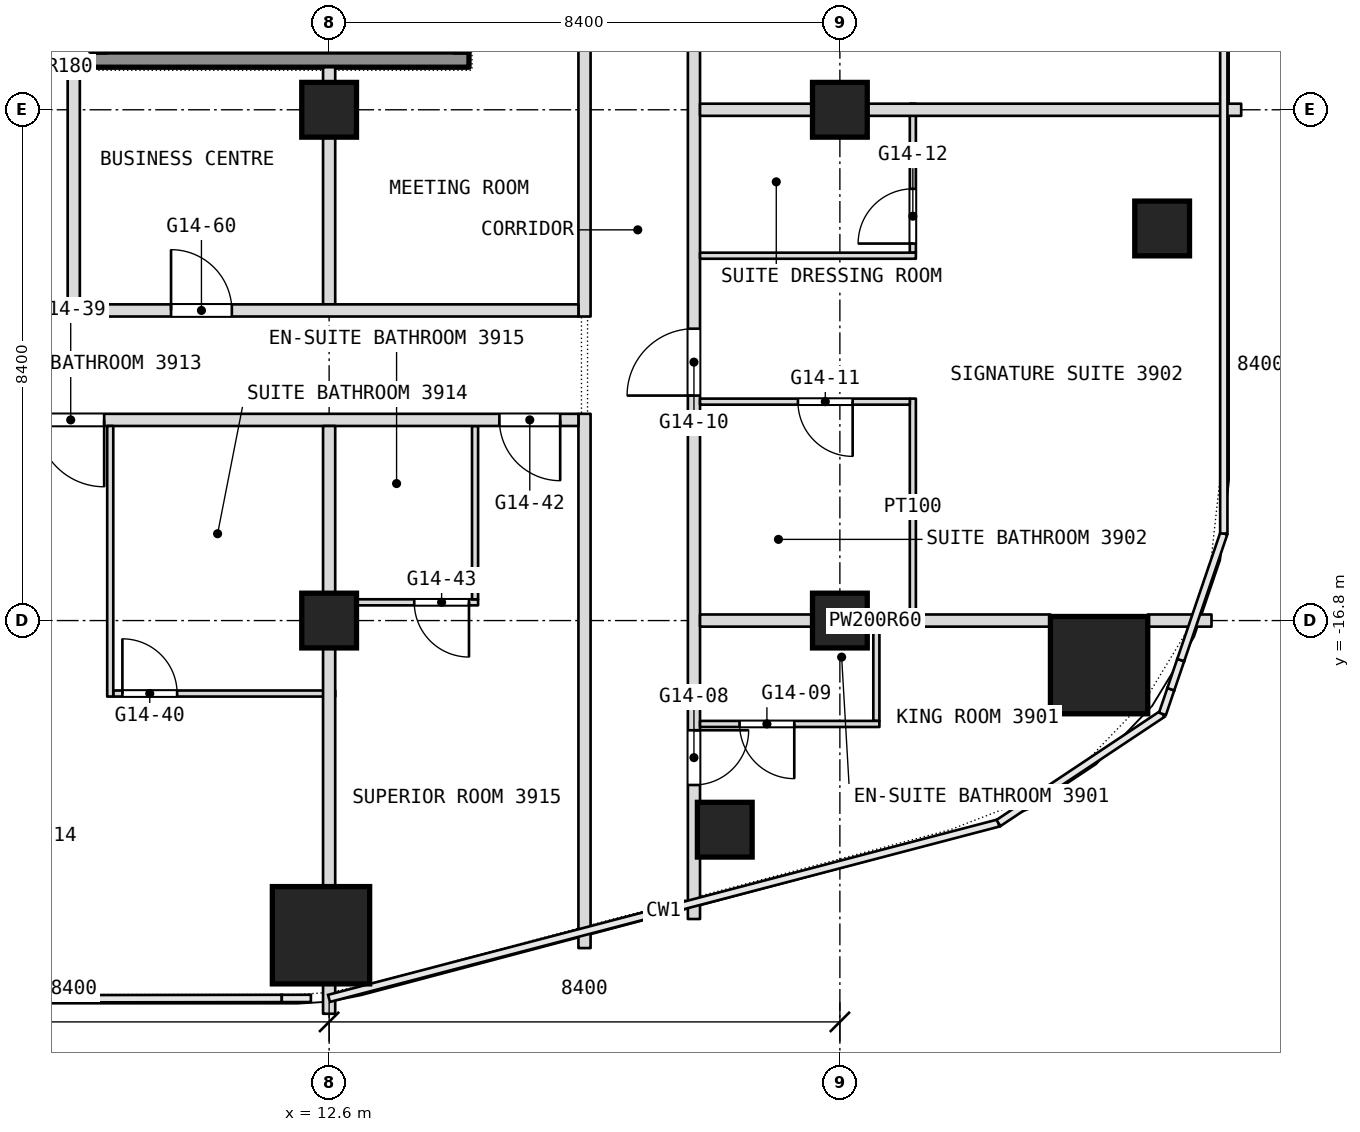
"""IFC4 building model, lengths in metres.
Left out: names, types, materials, properties, quantities, classifications, styles, units other than length and angle.
Written with IfcOpenShell. Run it as: python <this file> out.ifc"""

import sys

from ifc_helpers import new_model, si_unit, direction, frame, frame_2d, origin, origin_2d, place, context, subcontext, project, spatial, rectangle, extrude, element, fill, save


model = new_model("IFC4")
c1 = context("Model", 3, precision=1e-05, world=origin(), true_north=direction((0.0, 1.0)))
c2 = subcontext(c1, "Body", "Model", "MODEL_VIEW")
j1 = project(units=[si_unit("LENGTHUNIT", "METRE"), si_unit("PLANEANGLEUNIT", "RADIAN")], contexts=[c1])
p1 = place(None, origin())
s1 = spatial("IfcSite", under=j1, at=p1, CompositionType="ELEMENT")
p2 = place(p1, origin())
s2 = spatial("IfcBuilding", under=s1, at=p2, CompositionType="ELEMENT")
p3 = place(p2, frame((0.0, 0.0, 166.1)))
s3 = spatial("IfcBuildingStorey", under=s2, at=p3, CompositionType="ELEMENT", Elevation=166.1)
for number, where, z_axis, x_axis in (
    (1, (12.466, -21.975, 0.0), (0.0, 0.0, 1.0), (1.0, 0.0, 0.0)),
    (2, (25.263, -17.533, 0.0), (0.0, 0.0, 1.0), (1.0, 0.0, 0.0)),
):
    element("IfcColumn", number, at=place(p3, frame(where, z_axis=z_axis, x_axis=x_axis)), inside=s3, PredefinedType="COLUMN", context=c2, shape_type="SweptSolid", body=[
        extrude(rectangle(XDim=1.6, YDim=1.6, at=origin_2d()), origin(), (0.0, 0.0, 1.0), 3.6),
    ])
for number, where, z_axis, x_axis in (
    (3, (12.6, -16.8, 0.0), (0.0, 0.0, 1.0), (1.0, 0.0, 0.0)),
    (4, (12.6, -8.4, 0.0), (0.0, 0.0, 1.0), (1.0, 0.0, 0.0)),
    (5, (21.0, -16.8, 0.0), (0.0, 0.0, 1.0), (1.0, 0.0, 0.0)),
    (6, (21.0, -8.4, 0.0), (0.0, 0.0, 1.0), (1.0, 0.0, 0.0)),
    (7, (26.3, -10.352, 0.0), (0.0, 0.0, 1.0), (1.0, 0.0, 0.0)),
    (8, (19.107, -20.239, 0.0), (0.0, 0.0, 1.0), (1.0, 0.0, 0.0)),
):
    element("IfcColumn", number, at=place(p3, frame(where, z_axis=z_axis, x_axis=x_axis)), inside=s3, PredefinedType="COLUMN", context=c2, shape_type="SweptSolid", body=[
        extrude(rectangle(XDim=0.9, YDim=0.9, at=origin_2d()), origin(), (0.0, 0.0, 1.0), 3.6),
    ])
p4 = place(p3, frame((22.2, -16.7, 0.0), z_axis=(0.0, 0.0, 1.0), x_axis=(0.0, 1.0, 0.0)))
e9 = element("IfcWall", 9, at=p4, inside=s3, PredefinedType="PARTITIONING", context=c2, shape_type="SweptSolid", body=[
    extrude(rectangle(XDim=3.55, YDim=0.1, at=frame_2d((1.775, 0.0))), origin(), (0.0, 0.0, 1.0), 3.3),
])
p5 = place(p3, frame((22.2, -10.75, 0.0), z_axis=(0.0, 0.0, 1.0), x_axis=(0.0, 1.0, 0.0)))
e10 = element("IfcWall", 10, at=p5, inside=s3, PredefinedType="PARTITIONING", context=c2, shape_type="SweptSolid", body=[
    extrude(rectangle(XDim=2.45, YDim=0.1, at=frame_2d((1.225, 0.0))), origin(), (0.0, 0.0, 1.0), 3.3),
])
p6 = place(p5, frame((0.15, 0.0, 0.0)))
e11 = element("IfcOpeningElement", 11, at=p6, cuts=e10, PredefinedType="OPENING", context=c2, shape_type="SweptSolid", body=[
    extrude(rectangle(XDim=0.9, YDim=2.1, at=frame_2d((0.45, 1.05))), frame((0.0, 0.05, 0.0), z_axis=(0.0, -1.0, 0.0), x_axis=(1.0, 0.0, 0.0)), (0.0, 0.0, 1.0), 0.1),
])
p7 = place(p3, frame((21.6, -18.45, 0.0), z_axis=(0.0, 0.0, 1.0), x_axis=(0.0, 1.0, 0.0)))
e12 = element("IfcWall", 12, at=p7, inside=s3, PredefinedType="PARTITIONING", context=c2, shape_type="SweptSolid", body=[
    extrude(rectangle(XDim=1.75, YDim=0.1, at=frame_2d((0.875, 0.0))), origin(), (0.0, 0.0, 1.0), 3.3),
])
p8 = place(p3, frame((18.6, -21.708, 0.0), z_axis=(0.0, 0.0, 1.0), x_axis=(0.0, 1.0, 0.0)))
e13 = element("IfcWall", 13, at=p8, inside=s3, PredefinedType="PARTITIONING", context=c2, shape_type="SweptSolid", body=[
    extrude(rectangle(XDim=49.648, YDim=0.2, at=frame_2d((24.824, 0.0))), origin(), (0.0, 0.0, 1.0), 3.3),
])
p9 = place(p8, frame((2.204, 0.0, 0.0)))
e14 = element("IfcOpeningElement", 14, at=p9, cuts=e13, PredefinedType="OPENING", context=c2, shape_type="SweptSolid", body=[
    extrude(rectangle(XDim=0.9, YDim=2.1, at=frame_2d((0.45, 1.05))), frame((0.0, 0.1, 0.0), z_axis=(0.0, -1.0, 0.0), x_axis=(1.0, 0.0, 0.0)), (0.0, 0.0, 1.0), 0.2),
])
p10 = place(p8, frame((8.608, 0.0, 0.0)))
e15 = element("IfcOpeningElement", 15, at=p10, cuts=e13, PredefinedType="OPENING", context=c2, shape_type="SweptSolid", body=[
    extrude(rectangle(XDim=1.1, YDim=2.1, at=frame_2d((0.55, 1.05))), frame((0.0, 0.1, 0.0), z_axis=(0.0, -1.0, 0.0), x_axis=(1.0, 0.0, 0.0)), (0.0, 0.0, 1.0), 0.2),
])
p11 = place(p8, frame((16.608, 0.0, 0.0)))
e16 = element("IfcOpeningElement", 16, at=p11, cuts=e13, PredefinedType="OPENING", context=c2, shape_type="SweptSolid", body=[
    extrude(rectangle(XDim=1.8, YDim=2.1, at=frame_2d((0.9, 1.05))), frame((0.0, 0.1, 0.0), z_axis=(0.0, -1.0, 0.0), x_axis=(1.0, 0.0, 0.0)), (0.0, 0.0, 1.0), 0.2),
])
p12 = place(p8, frame((27.458, 0.0, 0.0)))
e17 = element("IfcOpeningElement", 17, at=p12, cuts=e13, PredefinedType="OPENING", context=c2, shape_type="SweptSolid", body=[
    extrude(rectangle(XDim=1.1, YDim=2.1, at=frame_2d((0.55, 1.05))), frame((0.0, 0.1, 0.0), z_axis=(0.0, -1.0, 0.0), x_axis=(1.0, 0.0, 0.0)), (0.0, 0.0, 1.0), 0.2),
])
p13 = place(p8, frame((30.508, 0.0, 0.0)))
e18 = element("IfcOpeningElement", 18, at=p13, cuts=e13, PredefinedType="OPENING", context=c2, shape_type="SweptSolid", body=[
    extrude(rectangle(XDim=1.0, YDim=2.1, at=frame_2d((0.5, 1.05))), frame((0.0, 0.1, 0.0), z_axis=(0.0, -1.0, 0.0), x_axis=(1.0, 0.0, 0.0)), (0.0, 0.0, 1.0), 0.2),
])
p14 = place(p8, frame((37.108, 0.0, 0.0)))
e19 = element("IfcOpeningElement", 19, at=p14, cuts=e13, PredefinedType="OPENING", context=c2, shape_type="SweptSolid", body=[
    extrude(rectangle(XDim=1.0, YDim=2.1, at=frame_2d((0.5, 1.05))), frame((0.0, 0.1, 0.0), z_axis=(0.0, -1.0, 0.0), x_axis=(1.0, 0.0, 0.0)), (0.0, 0.0, 1.0), 0.2),
])
p15 = place(p8, frame((42.608, 0.0, 0.0)))
e20 = element("IfcOpeningElement", 20, at=p15, cuts=e13, PredefinedType="OPENING", context=c2, shape_type="SweptSolid", body=[
    extrude(rectangle(XDim=1.0, YDim=2.1, at=frame_2d((0.5, 1.05))), frame((0.0, 0.1, 0.0), z_axis=(0.0, -1.0, 0.0), x_axis=(1.0, 0.0, 0.0)), (0.0, 0.0, 1.0), 0.2),
])
p16 = place(p8, frame((44.608, 0.0, 0.0)))
e21 = element("IfcOpeningElement", 21, at=p16, cuts=e13, PredefinedType="OPENING", context=c2, shape_type="SweptSolid", body=[
    extrude(rectangle(XDim=1.0, YDim=2.1, at=frame_2d((0.5, 1.05))), frame((0.0, 0.1, 0.0), z_axis=(0.0, -1.0, 0.0), x_axis=(1.0, 0.0, 0.0)), (0.0, 0.0, 1.0), 0.2),
])
p17 = place(p3, frame((18.7, -18.5, 0.0), z_axis=(0.0, 0.0, 1.0), x_axis=(1.0, 0.0, 0.0)))
e22 = element("IfcWall", 22, at=p17, inside=s3, PredefinedType="PARTITIONING", context=c2, shape_type="SweptSolid", body=[
    extrude(rectangle(XDim=2.95, YDim=0.1, at=frame_2d((1.475, 0.0))), origin(), (0.0, 0.0, 1.0), 3.3),
])
p18 = place(p17, frame((0.65, 0.0, 0.0)))
e23 = element("IfcOpeningElement", 23, at=p18, cuts=e22, PredefinedType="OPENING", context=c2, shape_type="SweptSolid", body=[
    extrude(rectangle(XDim=0.9, YDim=2.1, at=frame_2d((0.45, 1.05))), frame((0.0, 0.05, 0.0), z_axis=(0.0, -1.0, 0.0), x_axis=(1.0, 0.0, 0.0)), (0.0, 0.0, 1.0), 0.1),
])
p19 = place(p3, frame((9.05, -18.0, 0.0), z_axis=(0.0, 0.0, 1.0), x_axis=(1.0, 0.0, 0.0)))
e24 = element("IfcWall", 24, at=p19, inside=s3, PredefinedType="PARTITIONING", context=c2, shape_type="SweptSolid", body=[
    extrude(rectangle(XDim=3.65, YDim=0.1, at=frame_2d((1.825, 0.0))), origin(), (0.0, 0.0, 1.0), 3.3),
])
p20 = place(p19, frame((0.15, 0.0, 0.0)))
e25 = element("IfcOpeningElement", 25, at=p20, cuts=e24, PredefinedType="OPENING", context=c2, shape_type="SweptSolid", body=[
    extrude(rectangle(XDim=0.9, YDim=2.1, at=frame_2d((0.45, 1.05))), frame((0.0, 0.05, 0.0), z_axis=(0.0, -1.0, 0.0), x_axis=(1.0, 0.0, 0.0)), (0.0, 0.0, 1.0), 0.1),
])
p21 = place(p3, frame((16.8, -22.186, 0.0), z_axis=(0.0, 0.0, 1.0), x_axis=(0.0, 1.0, 0.0)))
e26 = element("IfcWall", 26, at=p21, inside=s3, PredefinedType="PARTITIONING", context=c2, shape_type="SweptSolid", body=[
    extrude(rectangle(XDim=8.786, YDim=0.2, at=frame_2d((4.393, 0.0))), origin(), (0.0, 0.0, 1.0), 3.3),
])
p22 = place(p3, frame((16.8, -11.8, 0.0), z_axis=(0.0, 0.0, 1.0), x_axis=(0.0, 1.0, 0.0)))
e27 = element("IfcWall", 27, at=p22, inside=s3, PredefinedType="PARTITIONING", context=c2, shape_type="SweptSolid", body=[
    extrude(rectangle(XDim=9.9, YDim=0.2, at=frame_2d((4.95, 0.0))), origin(), (0.0, 0.0, 1.0), 3.3),
])
p23 = place(p3, frame((18.7, -16.8, 0.0), z_axis=(0.0, 0.0, 1.0), x_axis=(1.0, 0.0, 0.0)))
e28 = element("IfcWall", 28, at=p23, inside=s3, PredefinedType="PARTITIONING", context=c2, shape_type="SweptSolid", body=[
    extrude(rectangle(XDim=5.763, YDim=0.2, at=frame_2d((2.881, 0.0))), origin(), (0.0, 0.0, 1.0), 2.85),
])
p24 = place(p3, frame((26.063, -16.8, 0.0), z_axis=(0.0, 0.0, 1.0), x_axis=(1.0, 0.0, 0.0)))
e29 = element("IfcWall", 29, at=p24, inside=s3, PredefinedType="PARTITIONING", context=c2, shape_type="SweptSolid", body=[
    extrude(rectangle(XDim=1.049, YDim=0.2, at=frame_2d((0.524, 0.0))), origin(), (0.0, 0.0, 1.0), 3.3),
])
p25 = place(p3, frame((12.7, -16.5, 0.0), z_axis=(0.0, 0.0, 1.0), x_axis=(1.0, 0.0, 0.0)))
e30 = element("IfcWall", 30, at=p25, inside=s3, PredefinedType="PARTITIONING", context=c2, shape_type="SweptSolid", body=[
    extrude(rectangle(XDim=2.35, YDim=0.1, at=frame_2d((1.175, 0.0))), origin(), (0.0, 0.0, 1.0), 3.3),
])
p26 = place(p25, frame((1.3, 0.0, 0.0)))
e31 = element("IfcOpeningElement", 31, at=p26, cuts=e30, PredefinedType="OPENING", context=c2, shape_type="SweptSolid", body=[
    extrude(rectangle(XDim=0.9, YDim=2.1, at=frame_2d((0.45, 1.05))), frame((0.0, 0.05, 0.0), z_axis=(0.0, -1.0, 0.0), x_axis=(1.0, 0.0, 0.0)), (0.0, 0.0, 1.0), 0.1),
])
p27 = place(p3, frame((15.0, -16.45, 0.0), z_axis=(0.0, 0.0, 1.0), x_axis=(0.0, 1.0, 0.0)))
e32 = element("IfcWall", 32, at=p27, inside=s3, PredefinedType="PARTITIONING", context=c2, shape_type="SweptSolid", body=[
    extrude(rectangle(XDim=2.85, YDim=0.1, at=frame_2d((1.425, 0.0))), origin(), (0.0, 0.0, 1.0), 3.3),
])
p28 = place(p3, frame((-3.2, -13.5, 0.0), z_axis=(0.0, 0.0, 1.0), x_axis=(1.0, 0.0, 0.0)))
e33 = element("IfcWall", 33, at=p28, inside=s3, PredefinedType="PARTITIONING", context=c2, shape_type="SweptSolid", body=[
    extrude(rectangle(XDim=19.9, YDim=0.2, at=frame_2d((9.95, 0.0))), origin(), (0.0, 0.0, 1.0), 3.3),
])
p29 = place(p28, frame((1.8, 0.0, 0.0)))
e34 = element("IfcOpeningElement", 34, at=p29, cuts=e33, PredefinedType="OPENING", context=c2, shape_type="SweptSolid", body=[
    extrude(rectangle(XDim=1.0, YDim=2.1, at=frame_2d((0.5, 1.05))), frame((0.0, 0.1, 0.0), z_axis=(0.0, -1.0, 0.0), x_axis=(1.0, 0.0, 0.0)), (0.0, 0.0, 1.0), 0.2),
])
p30 = place(p28, frame((3.6, 0.0, 0.0)))
e35 = element("IfcOpeningElement", 35, at=p30, cuts=e33, PredefinedType="OPENING", context=c2, shape_type="SweptSolid", body=[
    extrude(rectangle(XDim=1.0, YDim=2.1, at=frame_2d((0.5, 1.05))), frame((0.0, 0.1, 0.0), z_axis=(0.0, -1.0, 0.0), x_axis=(1.0, 0.0, 0.0)), (0.0, 0.0, 1.0), 0.2),
])
p31 = place(p28, frame((11.0, 0.0, 0.0)))
e36 = element("IfcOpeningElement", 36, at=p31, cuts=e33, PredefinedType="OPENING", context=c2, shape_type="SweptSolid", body=[
    extrude(rectangle(XDim=1.1, YDim=2.1, at=frame_2d((0.55, 1.05))), frame((0.0, 0.1, 0.0), z_axis=(0.0, -1.0, 0.0), x_axis=(1.0, 0.0, 0.0)), (0.0, 0.0, 1.0), 0.2),
])
p32 = place(p28, frame((18.6, 0.0, 0.0)))
e37 = element("IfcOpeningElement", 37, at=p32, cuts=e33, PredefinedType="OPENING", context=c2, shape_type="SweptSolid", body=[
    extrude(rectangle(XDim=1.0, YDim=2.1, at=frame_2d((0.5, 1.05))), frame((0.0, 0.1, 0.0), z_axis=(0.0, -1.0, 0.0), x_axis=(1.0, 0.0, 0.0)), (0.0, 0.0, 1.0), 0.2),
])
p33 = place(p3, frame((18.7, -13.2, 0.0), z_axis=(0.0, 0.0, 1.0), x_axis=(1.0, 0.0, 0.0)))
e38 = element("IfcWall", 38, at=p33, inside=s3, PredefinedType="PARTITIONING", context=c2, shape_type="SweptSolid", body=[
    extrude(rectangle(XDim=3.45, YDim=0.1, at=frame_2d((1.725, 0.0))), origin(), (0.0, 0.0, 1.0), 3.3),
])
p34 = place(p33, frame((1.61, 0.0, 0.0)))
e39 = element("IfcOpeningElement", 39, at=p34, cuts=e38, PredefinedType="OPENING", context=c2, shape_type="SweptSolid", body=[
    extrude(rectangle(XDim=0.9, YDim=2.1, at=frame_2d((0.45, 1.05))), frame((0.0, 0.05, 0.0), z_axis=(0.0, -1.0, 0.0), x_axis=(1.0, 0.0, 0.0)), (0.0, 0.0, 1.0), 0.1),
])
p35 = place(p3, frame((12.6, -23.266, 0.0), z_axis=(0.0, 0.0, 1.0), x_axis=(0.0, 1.0, 0.0)))
e40 = element("IfcWall", 40, at=p35, inside=s3, PredefinedType="PARTITIONING", context=c2, shape_type="SweptSolid", body=[
    extrude(rectangle(XDim=0.491, YDim=0.2, at=frame_2d((0.246, 0.0))), origin(), (0.0, 0.0, 1.0), 3.3),
])
p36 = place(p3, frame((12.6, -21.175, 0.0), z_axis=(0.0, 0.0, 1.0), x_axis=(0.0, 1.0, 0.0)))
e41 = element("IfcWall", 41, at=p36, inside=s3, PredefinedType="PARTITIONING", context=c2, shape_type="SweptSolid", body=[
    extrude(rectangle(XDim=7.575, YDim=0.2, at=frame_2d((3.788, 0.0))), origin(), (0.0, 0.0, 1.0), 2.486),
])
p37 = place(p3, frame((12.6, -11.6, 0.0), z_axis=(0.0, 0.0, 1.0), x_axis=(0.0, 1.0, 0.0)))
e42 = element("IfcWall", 42, at=p37, inside=s3, PredefinedType="PARTITIONING", context=c2, shape_type="SweptSolid", body=[
    extrude(rectangle(XDim=3.9, YDim=0.2, at=frame_2d((1.95, 0.0))), origin(), (0.0, 0.0, 1.0), 2.486),
])
p38 = place(p3, frame((-4.1, -11.7, 0.0), z_axis=(0.0, 0.0, 1.0), x_axis=(1.0, 0.0, 0.0)))
e43 = element("IfcWall", 43, at=p38, inside=s3, PredefinedType="PARTITIONING", context=c2, shape_type="SweptSolid", body=[
    extrude(rectangle(XDim=20.8, YDim=0.2, at=frame_2d((10.4, 0.0))), origin(), (0.0, 0.0, 1.0), 3.3),
])
p39 = place(p38, frame((14.1, 0.0, 0.0)))
e44 = element("IfcOpeningElement", 44, at=p39, cuts=e43, PredefinedType="OPENING", context=c2, shape_type="SweptSolid", body=[
    extrude(rectangle(XDim=1.0, YDim=2.1, at=frame_2d((0.5, 1.05))), frame((0.0, 0.1, 0.0), z_axis=(0.0, -1.0, 0.0), x_axis=(1.0, 0.0, 0.0)), (0.0, 0.0, 1.0), 0.2),
])
p40 = place(p38, frame((5.7, 0.0, 0.0)))
e45 = element("IfcOpeningElement", 45, at=p40, cuts=e43, PredefinedType="OPENING", context=c2, shape_type="SweptSolid", body=[
    extrude(rectangle(XDim=1.0, YDim=2.1, at=frame_2d((0.5, 1.05))), frame((0.0, 0.1, 0.0), z_axis=(0.0, -1.0, 0.0), x_axis=(1.0, 0.0, 0.0)), (0.0, 0.0, 1.0), 0.2),
])
p41 = place(p3, frame((18.7, -10.8, 0.0), z_axis=(0.0, 0.0, 1.0), x_axis=(1.0, 0.0, 0.0)))
e46 = element("IfcWall", 46, at=p41, inside=s3, PredefinedType="PARTITIONING", context=c2, shape_type="SweptSolid", body=[
    extrude(rectangle(XDim=3.55, YDim=0.1, at=frame_2d((1.775, 0.0))), origin(), (0.0, 0.0, 1.0), 3.3),
])
p42 = place(p3, frame((9.0, -18.05, 0.0), z_axis=(0.0, 0.0, 1.0), x_axis=(0.0, 1.0, 0.0)))
e47 = element("IfcWall", 47, at=p42, inside=s3, PredefinedType="PARTITIONING", context=c2, shape_type="SweptSolid", body=[
    extrude(rectangle(XDim=4.45, YDim=0.1, at=frame_2d((2.225, 0.0))), origin(), (0.0, 0.0, 1.0), 3.3),
])
p43 = place(p3, frame((8.4, -11.6, 0.0), z_axis=(0.0, 0.0, 1.0), x_axis=(0.0, 1.0, 0.0)))
e48 = element("IfcWall", 48, at=p43, inside=s3, PredefinedType="PARTITIONING", context=c2, shape_type="SweptSolid", body=[
    extrude(rectangle(XDim=3.8, YDim=0.2, at=frame_2d((1.9, 0.0))), origin(), (0.0, 0.0, 1.0), 3.3),
])
p44 = place(p3, frame((18.7, -8.4, 0.0), z_axis=(0.0, 0.0, 1.0), x_axis=(1.0, 0.0, 0.0)))
e49 = element("IfcWall", 49, at=p44, inside=s3, PredefinedType="PARTITIONING", context=c2, shape_type="SweptSolid", body=[
    extrude(rectangle(XDim=8.9, YDim=0.2, at=frame_2d((4.45, 0.0))), origin(), (0.0, 0.0, 1.0), 2.85),
])
p45 = place(p3, frame((7.2, -7.7, 0.0), z_axis=(0.0, 0.0, 1.0), x_axis=(1.0, 0.0, 0.0)))
e50 = element("IfcWall", 50, at=p45, inside=s3, PredefinedType="PARTITIONING", context=c2, shape_type="SweptSolid", body=[
    extrude(rectangle(XDim=1.3, YDim=0.2, at=frame_2d((0.65, 0.0))), origin(), (0.0, 0.0, 1.0), 3.3),
])
p46 = place(p3, frame((8.7, -7.575, 0.1), z_axis=(0.0, 0.0, 1.0), x_axis=(1.0, 0.0, 0.0)))
e51 = element("IfcWall", 51, at=p46, inside=s3, PredefinedType="SHEAR", context=c2, shape_type="SweptSolid", body=[
    extrude(rectangle(XDim=6.2, YDim=0.25, at=frame_2d((3.1, 0.0))), origin(), (0.0, 0.0, 1.0), 3.2),
])
p47 = place(p6, origin())
e52 = element("IfcDoor", 52, at=p47, inside=s3, OperationType="SINGLE_SWING_LEFT", PredefinedType="DOOR", context=c2, shape_type="SweptSolid", body=[
    extrude(rectangle(XDim=0.9, YDim=2.1, at=frame_2d((0.45, 1.05))), frame((0.0, 0.025, 0.0), z_axis=(0.0, -1.0, 0.0), x_axis=(1.0, 0.0, 0.0)), (0.0, 0.0, 1.0), 0.05),
])
fill(e11, e52)
p48 = place(p9, origin())
e53 = element("IfcDoor", 53, at=p48, inside=s3, OperationType="SINGLE_SWING_LEFT", PredefinedType="DOOR", context=c2, shape_type="SweptSolid", body=[
    extrude(rectangle(XDim=0.9, YDim=2.1, at=frame_2d((0.45, 1.05))), frame((0.0, 0.025, 0.0), z_axis=(0.0, -1.0, 0.0), x_axis=(1.0, 0.0, 0.0)), (0.0, 0.0, 1.0), 0.05),
])
fill(e14, e53)
p49 = place(p10, origin())
e54 = element("IfcDoor", 54, at=p49, inside=s3, OperationType="SINGLE_SWING_RIGHT", PredefinedType="DOOR", context=c2, shape_type="SweptSolid", body=[
    extrude(rectangle(XDim=1.1, YDim=2.1, at=frame_2d((0.55, 1.05))), frame((0.0, 0.025, 0.0), z_axis=(0.0, -1.0, 0.0), x_axis=(1.0, 0.0, 0.0)), (0.0, 0.0, 1.0), 0.05),
])
fill(e15, e54)
p50 = place(p18, origin())
e55 = element("IfcDoor", 55, at=p50, inside=s3, OperationType="SINGLE_SWING_LEFT", PredefinedType="DOOR", context=c2, shape_type="SweptSolid", body=[
    extrude(rectangle(XDim=0.9, YDim=2.1, at=frame_2d((0.45, 1.05))), frame((0.0, 0.025, 0.0), z_axis=(0.0, -1.0, 0.0), x_axis=(1.0, 0.0, 0.0)), (0.0, 0.0, 1.0), 0.05),
])
fill(e23, e55)
p51 = place(p20, origin())
e56 = element("IfcDoor", 56, at=p51, inside=s3, OperationType="SINGLE_SWING_LEFT", PredefinedType="DOOR", context=c2, shape_type="SweptSolid", body=[
    extrude(rectangle(XDim=0.9, YDim=2.1, at=frame_2d((0.45, 1.05))), frame((0.0, 0.025, 0.0), z_axis=(0.0, -1.0, 0.0), x_axis=(1.0, 0.0, 0.0)), (0.0, 0.0, 1.0), 0.05),
])
fill(e25, e56)
p52 = place(p26, origin())
e57 = element("IfcDoor", 57, at=p52, inside=s3, OperationType="SINGLE_SWING_RIGHT", PredefinedType="DOOR", context=c2, shape_type="SweptSolid", body=[
    extrude(rectangle(XDim=0.9, YDim=2.1, at=frame_2d((0.45, 1.05))), frame((0.0, 0.025, 0.0), z_axis=(0.0, -1.0, 0.0), x_axis=(1.0, 0.0, 0.0)), (0.0, 0.0, 1.0), 0.05),
])
fill(e31, e57)
p53 = place(p31, origin())
e58 = element("IfcDoor", 58, at=p53, inside=s3, OperationType="SINGLE_SWING_LEFT", PredefinedType="DOOR", context=c2, shape_type="SweptSolid", body=[
    extrude(rectangle(XDim=1.1, YDim=2.1, at=frame_2d((0.55, 1.05))), frame((0.0, 0.025, 0.0), z_axis=(0.0, -1.0, 0.0), x_axis=(1.0, 0.0, 0.0)), (0.0, 0.0, 1.0), 0.05),
])
fill(e36, e58)
p54 = place(p32, origin())
e59 = element("IfcDoor", 59, at=p54, inside=s3, OperationType="SINGLE_SWING_LEFT", PredefinedType="DOOR", context=c2, shape_type="SweptSolid", body=[
    extrude(rectangle(XDim=1.0, YDim=2.1, at=frame_2d((0.5, 1.05))), frame((0.0, 0.025, 0.0), z_axis=(0.0, -1.0, 0.0), x_axis=(1.0, 0.0, 0.0)), (0.0, 0.0, 1.0), 0.05),
])
fill(e37, e59)
p55 = place(p34, origin())
e60 = element("IfcDoor", 60, at=p55, inside=s3, OperationType="SINGLE_SWING_LEFT", PredefinedType="DOOR", context=c2, shape_type="SweptSolid", body=[
    extrude(rectangle(XDim=0.9, YDim=2.1, at=frame_2d((0.45, 1.05))), frame((0.0, 0.025, 0.0), z_axis=(0.0, -1.0, 0.0), x_axis=(1.0, 0.0, 0.0)), (0.0, 0.0, 1.0), 0.05),
])
fill(e39, e60)
p56 = place(p39, origin())
e61 = element("IfcDoor", 61, at=p56, inside=s3, OperationType="SINGLE_SWING_RIGHT", PredefinedType="DOOR", context=c2, shape_type="SweptSolid", body=[
    extrude(rectangle(XDim=1.0, YDim=2.1, at=frame_2d((0.5, 1.05))), frame((0.0, 0.025, 0.0), z_axis=(0.0, -1.0, 0.0), x_axis=(1.0, 0.0, 0.0)), (0.0, 0.0, 1.0), 0.05),
])
fill(e44, e61)
save(model, sys.argv[1])
